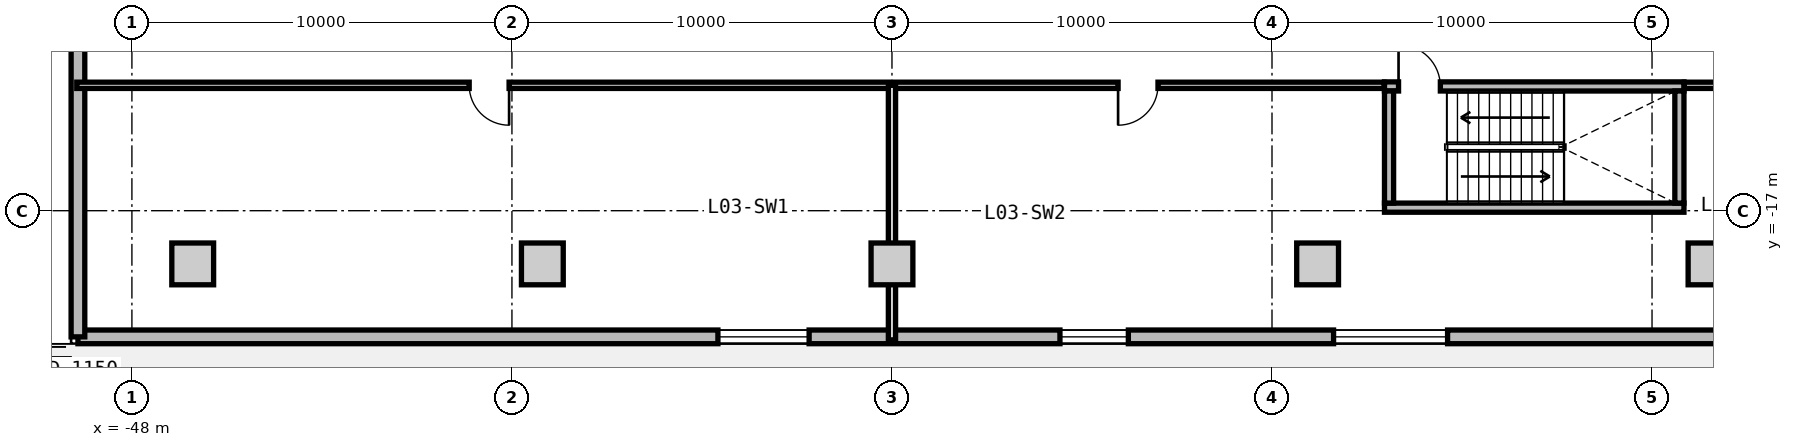
"""IFC4 building model, lengths in metres.
Left out: names, types, materials, properties, quantities, classifications, styles, units other than length and angle.
Written with IfcOpenShell. Run it as: python <this file> out.ifc"""

import sys

from ifc_helpers import new_model, si_unit, direction, frame, frame_2d, origin, origin_2d, place, context, subcontext, project, spatial, rectangle, extrude, source, transform, mapped, element, fill, save


model = new_model("IFC4")
c1 = context("Model", 3, precision=1e-05, world=origin(), true_north=direction((0.0, 1.0)))
c2 = subcontext(c1, "Body", "Model", "MODEL_VIEW")
j1 = project(units=[si_unit("LENGTHUNIT", "METRE"), si_unit("PLANEANGLEUNIT", "RADIAN")], contexts=[c1])
p1 = place(None, origin())
s1 = spatial("IfcSite", under=j1, at=p1, CompositionType="ELEMENT")
p2 = place(p1, origin())
s2 = spatial("IfcBuilding", under=s1, at=p2, CompositionType="ELEMENT")
p3 = place(p2, frame((0.0, 0.0, 12.6)))
s3 = spatial("IfcBuildingStorey", under=s2, at=p3, CompositionType="ELEMENT", Elevation=12.6)
m1 = source(origin(), c2, "Body", "SweptSolid", [
    extrude(rectangle(XDim=1.1, YDim=1.1, at=origin_2d()), origin(), (0.0, 0.0, 1.0), 4.2),
])
for number, where, z_axis, x_axis in (
    (1, (-46.4, -18.4, 0.0), (0.0, 0.0, 1.0), (1.0, 0.0, 0.0)),
    (2, (-37.2, -18.4, 0.0), (0.0, 0.0, 1.0), (1.0, 0.0, 0.0)),
    (3, (-28.0, -18.4, 0.0), (0.0, 0.0, 1.0), (1.0, 0.0, 0.0)),
    (4, (-16.8, -18.4, 0.0), (0.0, 0.0, 1.0), (1.0, 0.0, 0.0)),
    (5, (-6.5, -18.4, 0.0), (0.0, 0.0, 1.0), (1.0, 0.0, 0.0)),
):
    element("IfcColumn", number, at=place(p3, frame(where, z_axis=z_axis, x_axis=x_axis)), inside=s3, PredefinedType="COLUMN", context=c2, shape_type="MappedRepresentation", body=[
        mapped(m1, transform((0.0, 0.0, 0.0), x_axis=(1.0, 0.0, 0.0), y_axis=(0.0, 1.0, 0.0), z_axis=(0.0, 0.0, 1.0), scale=1.0)),
    ])
m2 = source(origin(), c2, "Body", "SweptSolid", [
    extrude(rectangle(XDim=98.84, YDim=0.36, at=frame_2d((49.42, 0.0))), origin(), (0.0, 0.0, 1.0), 3.88),
])
p4 = place(p3, frame((49.42, -20.32, 0.0), z_axis=(0.0, 0.0, 1.0), x_axis=(-1.0, 0.0, 0.0)))
e6 = element("IfcWall", 6, at=p4, inside=s3, PredefinedType="SOLIDWALL", context=c2, shape_type="MappedRepresentation", body=[
    mapped(m2, transform((0.0, 0.0, 0.0), x_axis=(1.0, 0.0, 0.0), y_axis=(0.0, 1.0, 0.0), z_axis=(0.0, 0.0, 1.0), scale=1.0)),
])
p5 = place(p4, frame((51.77, 0.0, 0.0)))
e7 = element("IfcOpeningElement", 7, at=p5, cuts=e6, PredefinedType="OPENING", context=c2, shape_type="SweptSolid", body=[
    extrude(rectangle(XDim=1.15, YDim=2.25, at=frame_2d((0.575, 1.125))), frame((0.0, 0.19, 0.0), z_axis=(0.0, -1.0, 0.0), x_axis=(1.0, 0.0, 0.0)), (0.0, 0.0, 1.0), 0.38),
])
p6 = place(p4, frame((4.0, 0.0, 0.85)))
e8 = element("IfcOpeningElement", 8, at=p6, cuts=e6, PredefinedType="OPENING", context=c2, shape_type="SweptSolid", body=[
    extrude(rectangle(XDim=2.4, YDim=2.2, at=frame_2d((1.2, 1.1))), frame((0.0, 0.19, 0.0), z_axis=(0.0, -1.0, 0.0), x_axis=(1.0, 0.0, 0.0)), (0.0, 0.0, 1.0), 0.38),
])
p7 = place(p4, frame((12.4, 0.0, 0.85)))
e9 = element("IfcOpeningElement", 9, at=p7, cuts=e6, PredefinedType="OPENING", context=c2, shape_type="SweptSolid", body=[
    extrude(rectangle(XDim=3.0, YDim=2.1, at=frame_2d((1.5, 1.05))), frame((0.0, 0.19, 0.0), z_axis=(0.0, -1.0, 0.0), x_axis=(1.0, 0.0, 0.0)), (0.0, 0.0, 1.0), 0.38),
])
p8 = place(p4, frame((29.2, 0.0, 0.85)))
e10 = element("IfcOpeningElement", 10, at=p8, cuts=e6, PredefinedType="OPENING", context=c2, shape_type="SweptSolid", body=[
    extrude(rectangle(XDim=2.4, YDim=2.2, at=frame_2d((1.2, 1.1))), frame((0.0, 0.19, 0.0), z_axis=(0.0, -1.0, 0.0), x_axis=(1.0, 0.0, 0.0)), (0.0, 0.0, 1.0), 0.38),
])
p9 = place(p4, frame((37.6, 0.0, 0.85)))
e11 = element("IfcOpeningElement", 11, at=p9, cuts=e6, PredefinedType="OPENING", context=c2, shape_type="SweptSolid", body=[
    extrude(rectangle(XDim=3.0, YDim=2.1, at=frame_2d((1.5, 1.05))), frame((0.0, 0.19, 0.0), z_axis=(0.0, -1.0, 0.0), x_axis=(1.0, 0.0, 0.0)), (0.0, 0.0, 1.0), 0.38),
])
p10 = place(p4, frame((62.8, 0.0, 0.85)))
e12 = element("IfcOpeningElement", 12, at=p10, cuts=e6, PredefinedType="OPENING", context=c2, shape_type="SweptSolid", body=[
    extrude(rectangle(XDim=3.0, YDim=2.1, at=frame_2d((1.5, 1.05))), frame((0.0, 0.19, 0.0), z_axis=(0.0, -1.0, 0.0), x_axis=(1.0, 0.0, 0.0)), (0.0, 0.0, 1.0), 0.38),
])
p11 = place(p4, frame((71.2, 0.0, 0.9)))
e13 = element("IfcOpeningElement", 13, at=p11, cuts=e6, PredefinedType="OPENING", context=c2, shape_type="SweptSolid", body=[
    extrude(rectangle(XDim=1.8, YDim=2.0, at=frame_2d((0.9, 1.0))), frame((0.0, 0.19, 0.0), z_axis=(0.0, -1.0, 0.0), x_axis=(1.0, 0.0, 0.0)), (0.0, 0.0, 1.0), 0.38),
])
p12 = place(p4, frame((79.6, 0.0, 0.85)))
e14 = element("IfcOpeningElement", 14, at=p12, cuts=e6, PredefinedType="OPENING", context=c2, shape_type="SweptSolid", body=[
    extrude(rectangle(XDim=2.4, YDim=2.2, at=frame_2d((1.2, 1.1))), frame((0.0, 0.19, 0.0), z_axis=(0.0, -1.0, 0.0), x_axis=(1.0, 0.0, 0.0)), (0.0, 0.0, 1.0), 0.38),
])
m3 = source(origin(), c2, "Body", "SweptSolid", [
    extrude(rectangle(XDim=40.64, YDim=0.36, at=frame_2d((20.32, 0.0))), origin(), (0.0, 0.0, 1.0), 3.88),
])
p13 = place(p3, frame((-49.42, -20.32, 0.0), z_axis=(0.0, 0.0, 1.0), x_axis=(0.0, 1.0, 0.0)))
e15 = element("IfcWall", 15, at=p13, inside=s3, PredefinedType="SOLIDWALL", context=c2, shape_type="MappedRepresentation", body=[
    mapped(m3, transform((0.0, 0.0, 0.0), x_axis=(1.0, 0.0, 0.0), y_axis=(0.0, 1.0, 0.0), z_axis=(0.0, 0.0, 1.0), scale=1.0)),
])
p14 = place(p13, frame((12.4, 0.0, 0.85)))
e16 = element("IfcOpeningElement", 16, at=p14, cuts=e15, PredefinedType="OPENING", context=c2, shape_type="SweptSolid", body=[
    extrude(rectangle(XDim=3.0, YDim=2.1, at=frame_2d((1.5, 1.05))), frame((0.0, 0.19, 0.0), z_axis=(0.0, -1.0, 0.0), x_axis=(1.0, 0.0, 0.0)), (0.0, 0.0, 1.0), 0.38),
])
m4 = source(origin(), c2, "Body", "SweptSolid", [
    extrude(rectangle(XDim=7.88, YDim=0.24, at=frame_2d((3.94, 0.0))), origin(), (0.0, 0.0, 1.0), 3.88),
])
p15 = place(p3, frame((-15.04, -13.73, 0.0), z_axis=(0.0, 0.0, 1.0), x_axis=(1.0, 0.0, 0.0)))
e17 = element("IfcWall", 17, at=p15, inside=s3, PredefinedType="PARTITIONING", context=c2, shape_type="MappedRepresentation", body=[
    mapped(m4, transform((0.0, 0.0, 0.0), x_axis=(1.0, 0.0, 0.0), y_axis=(0.0, 1.0, 0.0), z_axis=(0.0, 0.0, 1.0), scale=1.0)),
])
p16 = place(p15, frame((0.37, 0.0, 0.0)))
e18 = element("IfcOpeningElement", 18, at=p16, cuts=e17, PredefinedType="OPENING", context=c2, shape_type="SweptSolid", body=[
    extrude(rectangle(XDim=1.1, YDim=2.15, at=frame_2d((0.55, 1.075))), frame((0.0, 0.13, 0.0), z_axis=(0.0, -1.0, 0.0), x_axis=(1.0, 0.0, 0.0)), (0.0, 0.0, 1.0), 0.26),
])
p17 = place(p3, frame((-15.04, -16.92, 0.0), z_axis=(0.0, 0.0, 1.0), x_axis=(1.0, 0.0, 0.0)))
e19 = element("IfcWall", 19, at=p17, inside=s3, PredefinedType="PARTITIONING", context=c2, shape_type="MappedRepresentation", body=[
    mapped(m4, transform((0.0, 0.0, 0.0), x_axis=(1.0, 0.0, 0.0), y_axis=(0.0, 1.0, 0.0), z_axis=(0.0, 0.0, 1.0), scale=1.0)),
])
m5 = source(origin(), c2, "Body", "SweptSolid", [
    extrude(rectangle(XDim=2.95, YDim=0.24, at=frame_2d((1.475, 0.0))), origin(), (0.0, 0.0, 1.0), 3.88),
])
for number, where, z_axis, x_axis in (
    (20, (-14.92, -16.8, 0.0), (0.0, 0.0, 1.0), (0.0, 1.0, 0.0)),
    (21, (-7.28, -16.8, 0.0), (0.0, 0.0, 1.0), (0.0, 1.0, 0.0)),
):
    element("IfcWall", number, at=place(p3, frame(where, z_axis=z_axis, x_axis=x_axis)), inside=s3, PredefinedType="PARTITIONING", context=c2, shape_type="MappedRepresentation", body=[
        mapped(m5, transform((0.0, 0.0, 0.0), x_axis=(1.0, 0.0, 0.0), y_axis=(0.0, 1.0, 0.0), z_axis=(0.0, 0.0, 1.0), scale=1.0)),
    ])
m6 = source(origin(), c2, "Body", "SweptSolid", [
    extrude(rectangle(XDim=34.4, YDim=0.165, at=frame_2d((17.2, 0.0))), origin(), (0.0, 0.0, 1.0), 3.865),
])
p18 = place(p3, frame((-49.45, -13.7, 0.0), z_axis=(0.0, 0.0, 1.0), x_axis=(1.0, 0.0, 0.0)))
e22 = element("IfcWall", 22, at=p18, inside=s3, PredefinedType="PARTITIONING", context=c2, shape_type="MappedRepresentation", body=[
    mapped(m6, transform((0.0, 0.0, 0.0), x_axis=(1.0, 0.0, 0.0), y_axis=(0.0, 1.0, 0.0), z_axis=(0.0, 0.0, 1.0), scale=1.0)),
])
p19 = place(p18, frame((10.325, 0.0, 0.0)))
e23 = element("IfcOpeningElement", 23, at=p19, cuts=e22, PredefinedType="OPENING", context=c2, shape_type="SweptSolid", body=[
    extrude(rectangle(XDim=1.05, YDim=2.15, at=frame_2d((0.525, 1.075))), frame((0.0, 0.093, 0.0), z_axis=(0.0, -1.0, 0.0), x_axis=(1.0, 0.0, 0.0)), (0.0, 0.0, 1.0), 0.185),
])
p20 = place(p18, frame((27.4, 0.0, 0.0)))
e24 = element("IfcOpeningElement", 24, at=p20, cuts=e22, PredefinedType="OPENING", context=c2, shape_type="SweptSolid", body=[
    extrude(rectangle(XDim=1.05, YDim=2.15, at=frame_2d((0.525, 1.075))), frame((0.0, 0.093, 0.0), z_axis=(0.0, -1.0, 0.0), x_axis=(1.0, 0.0, 0.0)), (0.0, 0.0, 1.0), 0.185),
])
m7 = source(origin(), c2, "Body", "SweptSolid", [
    extrude(rectangle(XDim=14.3, YDim=0.165, at=frame_2d((7.15, 0.0))), origin(), (0.0, 0.0, 1.0), 3.865),
])
p21 = place(p3, frame((-7.15, -13.7, 0.0), z_axis=(0.0, 0.0, 1.0), x_axis=(1.0, 0.0, 0.0)))
e25 = element("IfcWall", 25, at=p21, inside=s3, PredefinedType="PARTITIONING", context=c2, shape_type="MappedRepresentation", body=[
    mapped(m7, transform((0.0, 0.0, 0.0), x_axis=(1.0, 0.0, 0.0), y_axis=(0.0, 1.0, 0.0), z_axis=(0.0, 0.0, 1.0), scale=1.0)),
])
p22 = place(p21, frame((6.625, 0.0, 0.0)))
e26 = element("IfcOpeningElement", 26, at=p22, cuts=e25, PredefinedType="OPENING", context=c2, shape_type="SweptSolid", body=[
    extrude(rectangle(XDim=1.05, YDim=2.15, at=frame_2d((0.525, 1.075))), frame((0.0, 0.093, 0.0), z_axis=(0.0, -1.0, 0.0), x_axis=(1.0, 0.0, 0.0)), (0.0, 0.0, 1.0), 0.185),
])
m8 = source(origin(), c2, "Body", "SweptSolid", [
    extrude(rectangle(XDim=6.7, YDim=0.19, at=frame_2d((3.35, 0.0))), origin(), (0.0, 0.0, 1.0), 3.865),
])
p23 = place(p3, frame((-28.0, -20.4, 0.0), z_axis=(0.0, 0.0, 1.0), x_axis=(0.0, 1.0, 0.0)))
e27 = element("IfcWall", 27, at=p23, inside=s3, PredefinedType="PARTITIONING", context=c2, shape_type="MappedRepresentation", body=[
    mapped(m8, transform((0.0, 0.0, 0.0), x_axis=(1.0, 0.0, 0.0), y_axis=(0.0, 1.0, 0.0), z_axis=(0.0, 0.0, 1.0), scale=1.0)),
])
m9 = source(origin(), c2, "Body", "SweptSolid", [
    extrude(rectangle(XDim=3.0, YDim=2.1, at=frame_2d((1.5, 1.05))), frame((0.0, 0.03, 0.0), z_axis=(0.0, -1.0, 0.0), x_axis=(1.0, 0.0, 0.0)), (0.0, 0.0, 1.0), 0.06),
])
p24 = place(p10, origin())
e28 = element("IfcWindow", 28, at=p24, inside=s3, PartitioningType="SINGLE_PANEL", PredefinedType="WINDOW", context=c2, shape_type="MappedRepresentation", body=[
    mapped(m9, transform((0.0, 0.0, 0.0), x_axis=(1.0, 0.0, 0.0), y_axis=(0.0, 1.0, 0.0), z_axis=(0.0, 0.0, 1.0), scale=1.0)),
])
fill(e12, e28)
m10 = source(origin(), c2, "Body", "SweptSolid", [
    extrude(rectangle(XDim=1.8, YDim=2.0, at=frame_2d((0.9, 1.0))), frame((0.0, 0.03, 0.0), z_axis=(0.0, -1.0, 0.0), x_axis=(1.0, 0.0, 0.0)), (0.0, 0.0, 1.0), 0.06),
])
p25 = place(p11, origin())
e29 = element("IfcWindow", 29, at=p25, inside=s3, PartitioningType="SINGLE_PANEL", PredefinedType="WINDOW", context=c2, shape_type="MappedRepresentation", body=[
    mapped(m10, transform((0.0, 0.0, 0.0), x_axis=(1.0, 0.0, 0.0), y_axis=(0.0, 1.0, 0.0), z_axis=(0.0, 0.0, 1.0), scale=1.0)),
])
fill(e13, e29)
m11 = source(origin(), c2, "Body", "SweptSolid", [
    extrude(rectangle(XDim=2.4, YDim=2.2, at=frame_2d((1.2, 1.1))), frame((0.0, 0.03, 0.0), z_axis=(0.0, -1.0, 0.0), x_axis=(1.0, 0.0, 0.0)), (0.0, 0.0, 1.0), 0.06),
])
p26 = place(p12, origin())
e30 = element("IfcWindow", 30, at=p26, inside=s3, PartitioningType="SINGLE_PANEL", PredefinedType="WINDOW", context=c2, shape_type="MappedRepresentation", body=[
    mapped(m11, transform((0.0, 0.0, 0.0), x_axis=(1.0, 0.0, 0.0), y_axis=(0.0, 1.0, 0.0), z_axis=(0.0, 0.0, 1.0), scale=1.0)),
])
fill(e14, e30)
m12 = source(origin(), c2, "Body", "SweptSolid", [
    extrude(rectangle(XDim=1.1, YDim=2.15, at=frame_2d((0.55, 1.075))), frame((0.0, 0.025, 0.0), z_axis=(0.0, -1.0, 0.0), x_axis=(1.0, 0.0, 0.0)), (0.0, 0.0, 1.0), 0.05),
])
p27 = place(p16, origin())
e31 = element("IfcDoor", 31, at=p27, inside=s3, OperationType="SINGLE_SWING_LEFT", PredefinedType="DOOR", context=c2, shape_type="MappedRepresentation", body=[
    mapped(m12, transform((0.0, 0.0, 0.0), x_axis=(1.0, 0.0, 0.0), y_axis=(0.0, 1.0, 0.0), z_axis=(0.0, 0.0, 1.0), scale=1.0)),
])
fill(e18, e31)
m13 = source(origin(), c2, "Body", "SweptSolid", [
    extrude(rectangle(XDim=1.05, YDim=2.15, at=frame_2d((0.525, 1.075))), frame((0.0, 0.025, 0.0), z_axis=(0.0, -1.0, 0.0), x_axis=(1.0, 0.0, 0.0)), (0.0, 0.0, 1.0), 0.05),
])
p28 = place(p19, frame((1.05, 0.0, 0.0), z_axis=(0.0, 0.0, 1.0), x_axis=(-1.0, 0.0, 0.0)))
e32 = element("IfcDoor", 32, at=p28, inside=s3, OperationType="SINGLE_SWING_LEFT", PredefinedType="DOOR", context=c2, shape_type="MappedRepresentation", body=[
    mapped(m13, transform((0.0, 0.0, 0.0), x_axis=(1.0, 0.0, 0.0), y_axis=(0.0, 1.0, 0.0), z_axis=(0.0, 0.0, 1.0), scale=1.0)),
])
fill(e23, e32)
p29 = place(p20, frame((1.05, 0.0, 0.0), z_axis=(0.0, 0.0, 1.0), x_axis=(-1.0, 0.0, 0.0)))
e33 = element("IfcDoor", 33, at=p29, inside=s3, OperationType="SINGLE_SWING_RIGHT", PredefinedType="DOOR", context=c2, shape_type="MappedRepresentation", body=[
    mapped(m13, transform((0.0, 0.0, 0.0), x_axis=(1.0, 0.0, 0.0), y_axis=(0.0, 1.0, 0.0), z_axis=(0.0, 0.0, 1.0), scale=1.0)),
])
fill(e24, e33)
save(model, sys.argv[1])
